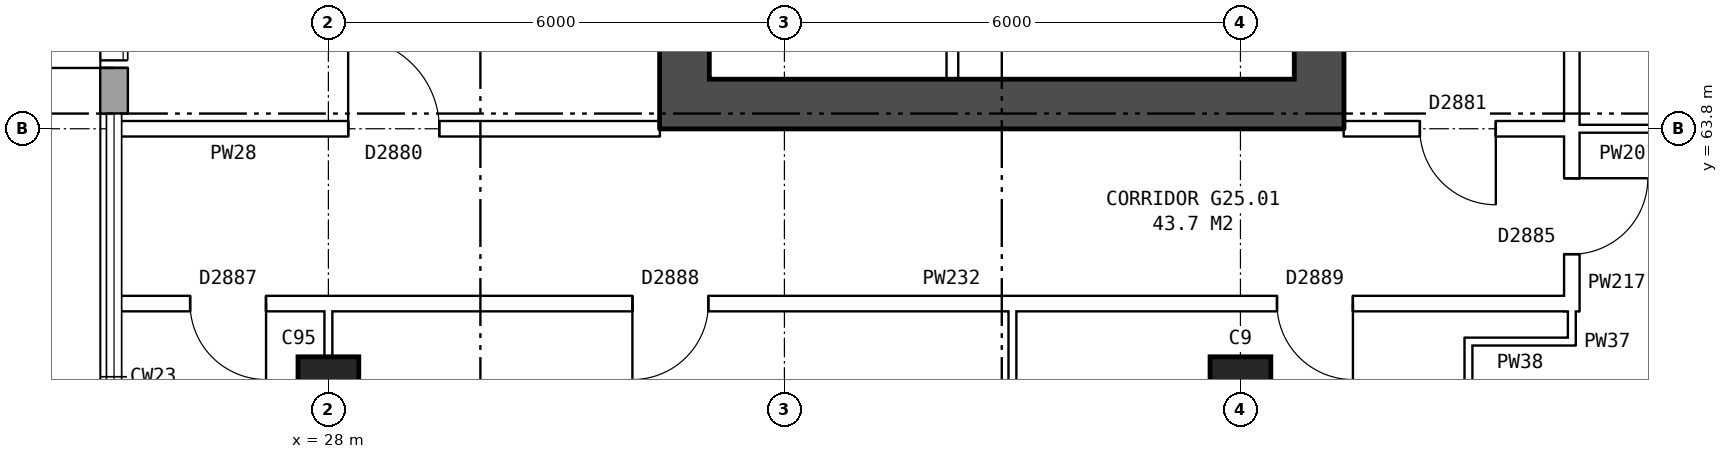
"""IFC4 building model, lengths in metres.
Left out: names, types, materials, properties, quantities, classifications, styles, units other than length and angle.
Written with IfcOpenShell. Run it as: python <this file> out.ifc"""

import sys

from ifc_helpers import new_model, si_unit, direction, frame, frame_2d, origin, origin_2d, place, context, subcontext, project, spatial, rectangle, extrude, element, fill, save


model = new_model("IFC4")
c1 = context("Model", 3, precision=1e-05, world=origin(), true_north=direction((0.0, 1.0)))
c2 = subcontext(c1, "Body", "Model", "MODEL_VIEW")
j1 = project(units=[si_unit("LENGTHUNIT", "METRE"), si_unit("PLANEANGLEUNIT", "RADIAN")], contexts=[c1])
p1 = place(None, origin())
s1 = spatial("IfcSite", under=j1, at=p1, CompositionType="ELEMENT")
p2 = place(p1, origin())
s2 = spatial("IfcBuilding", under=s1, at=p2, CompositionType="ELEMENT")
p3 = place(p2, frame((0.0, 0.0, 90.2)))
s3 = spatial("IfcBuildingStorey", under=s2, at=p3, CompositionType="ELEMENT", Elevation=90.2)
for number, where, z_axis, x_axis in (
    (1, (28.0, 60.4, 0.0), (0.0, 0.0, 1.0), (1.0, 0.0, 0.0)),
    (2, (40.0, 60.4, 0.0), (0.0, 0.0, 1.0), (1.0, 0.0, 0.0)),
):
    element("IfcColumn", number, at=place(p3, frame(where, z_axis=z_axis, x_axis=x_axis)), inside=s3, PredefinedType="COLUMN", context=c2, shape_type="SweptSolid", body=[
        extrude(rectangle(XDim=0.8, YDim=0.8, at=origin_2d()), origin(), (0.0, 0.0, 1.0), 5.6),
    ])
p4 = place(p3, frame((25.18, 67.0, 0.0), z_axis=(0.0, 0.0, 1.0), x_axis=(0.0, -1.0, 0.0)))
e3 = element("IfcWall", 3, at=p4, inside=s3, PredefinedType="STANDARD", context=c2, shape_type="SweptSolid", body=[
    extrude(rectangle(XDim=3.0, YDim=0.36, at=frame_2d((1.5, 0.0))), origin(), (0.0, 0.0, 1.0), 5.6),
])
p5 = place(p4, frame((0.7, 0.0, 3.4)))
e4 = element("IfcOpeningElement", 4, at=p5, cuts=e3, PredefinedType="OPENING", context=c2, shape_type="SweptSolid", body=[
    extrude(rectangle(XDim=1.6, YDim=1.2, at=frame_2d((0.8, 0.6))), frame((0.0, 0.19, 0.0), z_axis=(0.0, -1.0, 0.0), x_axis=(1.0, 0.0, 0.0)), (0.0, 0.0, 1.0), 0.38),
])
p6 = place(p4, frame((0.6, 0.0, 0.0)))
e5 = element("IfcOpeningElement", 5, at=p6, cuts=e3, PredefinedType="OPENING", context=c2, shape_type="SweptSolid", body=[
    extrude(rectangle(XDim=1.8, YDim=2.4, at=frame_2d((0.9, 1.2))), frame((0.0, 0.19, 0.0), z_axis=(0.0, -1.0, 0.0), x_axis=(1.0, 0.0, 0.0)), (0.0, 0.0, 1.0), 0.38),
])
p7 = place(p3, frame((41.035, 75.55, 0.0), z_axis=(0.0, 0.0, 1.0), x_axis=(0.0, -1.0, 0.0)))
e6 = element("IfcWall", 6, at=p7, inside=s3, PredefinedType="SHEAR", context=c2, shape_type="SweptSolid", body=[
    extrude(rectangle(XDim=11.1, YDim=0.65, at=frame_2d((5.55, 0.0))), origin(), (0.0, 0.0, 1.0), 5.6),
])
p8 = place(p7, frame((0.675, 0.0, 0.0)))
e7 = element("IfcOpeningElement", 7, at=p8, cuts=e6, PredefinedType="OPENING", context=c2, shape_type="SweptSolid", body=[
    extrude(rectangle(XDim=1.1, YDim=2.1, at=frame_2d((0.55, 1.05))), frame((0.0, 0.335, 0.0), z_axis=(0.0, -1.0, 0.0), x_axis=(1.0, 0.0, 0.0)), (0.0, 0.0, 1.0), 0.67),
])
p9 = place(p7, frame((2.95, 0.0, 0.0)))
e8 = element("IfcOpeningElement", 8, at=p9, cuts=e6, PredefinedType="OPENING", context=c2, shape_type="SweptSolid", body=[
    extrude(rectangle(XDim=1.1, YDim=2.1, at=frame_2d((0.55, 1.05))), frame((0.0, 0.335, 0.0), z_axis=(0.0, -1.0, 0.0), x_axis=(1.0, 0.0, 0.0)), (0.0, 0.0, 1.0), 0.67),
])
p10 = place(p7, frame((5.15, 0.0, 0.0)))
e9 = element("IfcOpeningElement", 9, at=p10, cuts=e6, PredefinedType="OPENING", context=c2, shape_type="SweptSolid", body=[
    extrude(rectangle(XDim=1.1, YDim=2.1, at=frame_2d((0.55, 1.05))), frame((0.0, 0.335, 0.0), z_axis=(0.0, -1.0, 0.0), x_axis=(1.0, 0.0, 0.0)), (0.0, 0.0, 1.0), 0.67),
])
p11 = place(p7, frame((7.35, 0.0, 0.0)))
e10 = element("IfcOpeningElement", 10, at=p11, cuts=e6, PredefinedType="OPENING", context=c2, shape_type="SweptSolid", body=[
    extrude(rectangle(XDim=1.1, YDim=2.1, at=frame_2d((0.55, 1.05))), frame((0.0, 0.335, 0.0), z_axis=(0.0, -1.0, 0.0), x_axis=(1.0, 0.0, 0.0)), (0.0, 0.0, 1.0), 0.67),
])
p12 = place(p7, frame((9.25, 0.0, 0.0)))
e11 = element("IfcOpeningElement", 11, at=p12, cuts=e6, PredefinedType="OPENING", context=c2, shape_type="SweptSolid", body=[
    extrude(rectangle(XDim=1.1, YDim=2.1, at=frame_2d((0.55, 1.05))), frame((0.0, 0.335, 0.0), z_axis=(0.0, -1.0, 0.0), x_axis=(1.0, 0.0, 0.0)), (0.0, 0.0, 1.0), 0.67),
])
p13 = place(p3, frame((32.685, 75.55, 0.0), z_axis=(0.0, 0.0, 1.0), x_axis=(0.0, -1.0, 0.0)))
e12 = element("IfcWall", 12, at=p13, inside=s3, PredefinedType="SHEAR", context=c2, shape_type="SweptSolid", body=[
    extrude(rectangle(XDim=11.1, YDim=0.65, at=frame_2d((5.55, 0.0))), origin(), (0.0, 0.0, 1.0), 5.6),
])
p14 = place(p3, frame((41.36, 64.125, 0.0), z_axis=(0.0, 0.0, 1.0), x_axis=(-1.0, 0.0, 0.0)))
e13 = element("IfcWall", 13, at=p14, inside=s3, PredefinedType="SHEAR", context=c2, shape_type="SweptSolid", body=[
    extrude(rectangle(XDim=9.0, YDim=0.65, at=frame_2d((4.5, 0.0))), origin(), (0.0, 0.0, 1.0), 5.6),
])
p15 = place(p3, frame((36.21, 66.55, 0.0), z_axis=(0.0, 0.0, 1.0), x_axis=(0.0, -1.0, 0.0)))
e14 = element("IfcWall", 14, at=p15, inside=s3, PredefinedType="PARTITIONING", context=c2, shape_type="SweptSolid", body=[
    extrude(rectangle(XDim=2.1, YDim=0.15, at=frame_2d((1.05, 0.0))), origin(), (0.0, 0.0, 1.0), 5.6),
])
p16 = place(p15, frame((0.625, 0.0, 0.0)))
e15 = element("IfcOpeningElement", 15, at=p16, cuts=e14, PredefinedType="OPENING", context=c2, shape_type="SweptSolid", body=[
    extrude(rectangle(XDim=0.85, YDim=2.1, at=frame_2d((0.425, 1.05))), frame((0.0, 0.085, 0.0), z_axis=(0.0, -1.0, 0.0), x_axis=(1.0, 0.0, 0.0)), (0.0, 0.0, 1.0), 0.17),
])
p17 = place(p3, frame((44.36, 63.9, 0.0), z_axis=(0.0, 0.0, 1.0), x_axis=(0.0, 1.0, 0.0)))
e16 = element("IfcWall", 16, at=p17, inside=s3, PredefinedType="PARTITIONING", context=c2, shape_type="SweptSolid", body=[
    extrude(rectangle(XDim=12.2, YDim=0.2, at=frame_2d((6.1, 0.0))), origin(), (0.0, 0.0, 1.0), 5.6),
])
p18 = place(p17, frame((5.1, 0.0, 0.0)))
e17 = element("IfcOpeningElement", 17, at=p18, cuts=e16, PredefinedType="OPENING", context=c2, shape_type="SweptSolid", body=[
    extrude(rectangle(XDim=2.0, YDim=2.1, at=frame_2d((1.0, 1.05))), frame((0.0, 0.11, 0.0), z_axis=(0.0, -1.0, 0.0), x_axis=(1.0, 0.0, 0.0)), (0.0, 0.0, 1.0), 0.22),
])
p19 = place(p3, frame((42.95, 61.0, 0.0), z_axis=(0.0, 0.0, 1.0), x_axis=(1.0, 0.0, 0.0)))
e18 = element("IfcWall", 18, at=p19, inside=s3, PredefinedType="PARTITIONING", context=c2, shape_type="SweptSolid", body=[
    extrude(rectangle(XDim=1.46, YDim=0.1, at=frame_2d((0.73, 0.0))), origin(), (0.0, 0.0, 1.0), 5.6),
])
p20 = place(p3, frame((25.24, 61.5, 0.0), z_axis=(0.0, 0.0, 1.0), x_axis=(1.0, 0.0, 0.0)))
e19 = element("IfcWall", 19, at=p20, inside=s3, PredefinedType="PARTITIONING", context=c2, shape_type="SweptSolid", body=[
    extrude(rectangle(XDim=19.22, YDim=0.2, at=frame_2d((9.61, 0.0))), origin(), (0.0, 0.0, 1.0), 5.6),
])
p21 = place(p20, frame((0.94, 0.0, 0.0)))
e20 = element("IfcOpeningElement", 20, at=p21, cuts=e19, PredefinedType="OPENING", context=c2, shape_type="SweptSolid", body=[
    extrude(rectangle(XDim=1.0, YDim=2.1, at=frame_2d((0.5, 1.05))), frame((0.0, 0.11, 0.0), z_axis=(0.0, -1.0, 0.0), x_axis=(1.0, 0.0, 0.0)), (0.0, 0.0, 1.0), 0.22),
])
p22 = place(p20, frame((6.76, 0.0, 0.0)))
e21 = element("IfcOpeningElement", 21, at=p22, cuts=e19, PredefinedType="OPENING", context=c2, shape_type="SweptSolid", body=[
    extrude(rectangle(XDim=1.0, YDim=2.1, at=frame_2d((0.5, 1.05))), frame((0.0, 0.11, 0.0), z_axis=(0.0, -1.0, 0.0), x_axis=(1.0, 0.0, 0.0)), (0.0, 0.0, 1.0), 0.22),
])
p23 = place(p20, frame((15.24, 0.0, 0.0)))
e22 = element("IfcOpeningElement", 22, at=p23, cuts=e19, PredefinedType="OPENING", context=c2, shape_type="SweptSolid", body=[
    extrude(rectangle(XDim=1.0, YDim=2.1, at=frame_2d((0.5, 1.05))), frame((0.0, 0.11, 0.0), z_axis=(0.0, -1.0, 0.0), x_axis=(1.0, 0.0, 0.0)), (0.0, 0.0, 1.0), 0.22),
])
p24 = place(p3, frame((25.24, 63.8, 0.0), z_axis=(0.0, 0.0, 1.0), x_axis=(1.0, 0.0, 0.0)))
e23 = element("IfcWall", 23, at=p24, inside=s3, PredefinedType="PARTITIONING", context=c2, shape_type="SweptSolid", body=[
    extrude(rectangle(XDim=7.12, YDim=0.2, at=frame_2d((3.56, 0.0))), origin(), (0.0, 0.0, 1.0), 5.6),
])
p25 = place(p24, frame((3.02, 0.0, 0.0)))
e24 = element("IfcOpeningElement", 24, at=p25, cuts=e23, PredefinedType="OPENING", context=c2, shape_type="SweptSolid", body=[
    extrude(rectangle(XDim=1.2, YDim=2.1, at=frame_2d((0.6, 1.05))), frame((0.0, 0.11, 0.0), z_axis=(0.0, -1.0, 0.0), x_axis=(1.0, 0.0, 0.0)), (0.0, 0.0, 1.0), 0.22),
])
p26 = place(p3, frame((41.36, 63.8, 0.0), z_axis=(0.0, 0.0, 1.0), x_axis=(1.0, 0.0, 0.0)))
e25 = element("IfcWall", 25, at=p26, inside=s3, PredefinedType="PARTITIONING", context=c2, shape_type="SweptSolid", body=[
    extrude(rectangle(XDim=3.1, YDim=0.2, at=frame_2d((1.55, 0.0))), origin(), (0.0, 0.0, 1.0), 5.6),
])
p27 = place(p26, frame((1.0, 0.0, 0.0)))
e26 = element("IfcOpeningElement", 26, at=p27, cuts=e25, PredefinedType="OPENING", context=c2, shape_type="SweptSolid", body=[
    extrude(rectangle(XDim=1.0, YDim=2.1, at=frame_2d((0.5, 1.05))), frame((0.0, 0.11, 0.0), z_axis=(0.0, -1.0, 0.0), x_axis=(1.0, 0.0, 0.0)), (0.0, 0.0, 1.0), 0.22),
])
p28 = place(p3, frame((44.26, 63.8, 0.0), z_axis=(0.0, 0.0, 1.0), x_axis=(1.0, 0.0, 0.0)))
e27 = element("IfcWall", 27, at=p28, inside=s3, PredefinedType="PARTITIONING", context=c2, shape_type="SweptSolid", body=[
    extrude(rectangle(XDim=19.38, YDim=0.1, at=frame_2d((9.69, 0.0))), origin(), (0.0, 0.0, 1.0), 5.6),
])
p29 = place(p28, frame((4.42, 0.0, 0.0)))
e28 = element("IfcOpeningElement", 28, at=p29, cuts=e27, PredefinedType="OPENING", context=c2, shape_type="SweptSolid", body=[
    extrude(rectangle(XDim=1.0, YDim=2.1, at=frame_2d((0.5, 1.05))), frame((0.0, 0.06, 0.0), z_axis=(0.0, -1.0, 0.0), x_axis=(1.0, 0.0, 0.0)), (0.0, 0.0, 1.0), 0.12),
])
p30 = place(p28, frame((14.06, 0.0, 0.0)))
e29 = element("IfcOpeningElement", 29, at=p30, cuts=e27, PredefinedType="OPENING", context=c2, shape_type="SweptSolid", body=[
    extrude(rectangle(XDim=1.0, YDim=2.1, at=frame_2d((0.5, 1.05))), frame((0.0, 0.06, 0.0), z_axis=(0.0, -1.0, 0.0), x_axis=(1.0, 0.0, 0.0)), (0.0, 0.0, 1.0), 0.12),
])
p31 = place(p3, frame((28.0, 54.389, 0.0), z_axis=(0.0, 0.0, 1.0), x_axis=(0.0, 1.0, 0.0)))
e30 = element("IfcWall", 30, at=p31, inside=s3, PredefinedType="PARTITIONING", context=c2, shape_type="SweptSolid", body=[
    extrude(rectangle(XDim=7.211, YDim=0.1, at=frame_2d((3.605, 0.0))), origin(), (0.0, 0.0, 1.0), 5.6),
])
p32 = place(p3, frame((37.0, 54.24, 0.0), z_axis=(0.0, 0.0, 1.0), x_axis=(0.0, 1.0, 0.0)))
e31 = element("IfcWall", 31, at=p32, inside=s3, PredefinedType="PARTITIONING", context=c2, shape_type="SweptSolid", body=[
    extrude(rectangle(XDim=7.36, YDim=0.1, at=frame_2d((3.68, 0.0))), origin(), (0.0, 0.0, 1.0), 5.6),
])
p33 = place(p3, frame((43.0, 54.24, 0.0), z_axis=(0.0, 0.0, 1.0), x_axis=(0.0, 1.0, 0.0)))
e32 = element("IfcWall", 32, at=p33, inside=s3, PredefinedType="PARTITIONING", context=c2, shape_type="SweptSolid", body=[
    extrude(rectangle(XDim=6.81, YDim=0.1, at=frame_2d((3.405, 0.0))), origin(), (0.0, 0.0, 1.0), 5.6),
])
p34 = place(p3, frame((44.36, 61.398, 0.0), z_axis=(0.0, 0.0, 1.0), x_axis=(0.0, 1.0, 0.0)))
e33 = element("IfcWall", 33, at=p34, inside=s3, PredefinedType="PARTITIONING", context=c2, shape_type="SweptSolid", body=[
    extrude(rectangle(XDim=2.502, YDim=0.2, at=frame_2d((1.251, 0.0))), origin(), (0.0, 0.0, 1.0), 5.6),
])
p35 = place(p34, frame((0.751, 0.0, 0.0)))
e34 = element("IfcOpeningElement", 34, at=p35, cuts=e33, PredefinedType="OPENING", context=c2, shape_type="SweptSolid", body=[
    extrude(rectangle(XDim=1.0, YDim=2.1, at=frame_2d((0.5, 1.05))), frame((0.0, 0.11, 0.0), z_axis=(0.0, -1.0, 0.0), x_axis=(1.0, 0.0, 0.0)), (0.0, 0.0, 1.0), 0.22),
])
p36 = place(p3, frame((44.36, 60.95, 0.0), z_axis=(0.0, 0.0, 1.0), x_axis=(0.0, 1.0, 0.0)))
e35 = element("IfcWall", 35, at=p36, inside=s3, PredefinedType="PARTITIONING", context=c2, shape_type="SweptSolid", body=[
    extrude(rectangle(XDim=0.652, YDim=0.1, at=frame_2d((0.326, 0.0))), origin(), (0.0, 0.0, 1.0), 5.6),
])
p37 = place(p5, origin())
e36 = element("IfcWindow", 36, at=p37, inside=s3, PartitioningType="DOUBLE_PANEL_HORIZONTAL", PredefinedType="WINDOW", context=c2, shape_type="SweptSolid", body=[
    extrude(rectangle(XDim=1.6, YDim=1.2, at=frame_2d((0.8, 0.6))), frame((0.0, 0.15, 0.0), z_axis=(0.0, -1.0, 0.0), x_axis=(1.0, 0.0, 0.0)), (0.0, 0.0, 1.0), 0.06),
])
fill(e4, e36)
p38 = place(p6, frame((1.8, 0.0, 0.0), z_axis=(0.0, 0.0, 1.0), x_axis=(-1.0, 0.0, 0.0)))
e37 = element("IfcDoor", 37, at=p38, inside=s3, OperationType="DOUBLE_DOOR_SINGLE_SWING", PredefinedType="DOOR", context=c2, shape_type="SweptSolid", body=[
    extrude(rectangle(XDim=1.8, YDim=2.4, at=frame_2d((0.9, 1.2))), frame((0.0, 0.025, 0.0), z_axis=(0.0, -1.0, 0.0), x_axis=(1.0, 0.0, 0.0)), (0.0, 0.0, 1.0), 0.05),
])
fill(e5, e37)
p39 = place(p21, frame((1.0, 0.0, 0.0), z_axis=(0.0, 0.0, 1.0), x_axis=(-1.0, 0.0, 0.0)))
e38 = element("IfcDoor", 38, at=p39, inside=s3, OperationType="SINGLE_SWING_LEFT", PredefinedType="DOOR", context=c2, shape_type="SweptSolid", body=[
    extrude(rectangle(XDim=1.0, YDim=2.1, at=frame_2d((0.5, 1.05))), frame((0.0, 0.025, 0.0), z_axis=(0.0, -1.0, 0.0), x_axis=(1.0, 0.0, 0.0)), (0.0, 0.0, 1.0), 0.05),
])
fill(e20, e38)
p40 = place(p22, frame((1.0, 0.0, 0.0), z_axis=(0.0, 0.0, 1.0), x_axis=(-1.0, 0.0, 0.0)))
e39 = element("IfcDoor", 39, at=p40, inside=s3, OperationType="SINGLE_SWING_RIGHT", PredefinedType="DOOR", context=c2, shape_type="SweptSolid", body=[
    extrude(rectangle(XDim=1.0, YDim=2.1, at=frame_2d((0.5, 1.05))), frame((0.0, 0.025, 0.0), z_axis=(0.0, -1.0, 0.0), x_axis=(1.0, 0.0, 0.0)), (0.0, 0.0, 1.0), 0.05),
])
fill(e21, e39)
p41 = place(p23, frame((1.0, 0.0, 0.0), z_axis=(0.0, 0.0, 1.0), x_axis=(-1.0, 0.0, 0.0)))
e40 = element("IfcDoor", 40, at=p41, inside=s3, OperationType="SINGLE_SWING_LEFT", PredefinedType="DOOR", context=c2, shape_type="SweptSolid", body=[
    extrude(rectangle(XDim=1.0, YDim=2.1, at=frame_2d((0.5, 1.05))), frame((0.0, 0.025, 0.0), z_axis=(0.0, -1.0, 0.0), x_axis=(1.0, 0.0, 0.0)), (0.0, 0.0, 1.0), 0.05),
])
fill(e22, e40)
p42 = place(p25, origin())
e41 = element("IfcDoor", 41, at=p42, inside=s3, OperationType="SINGLE_SWING_LEFT", PredefinedType="DOOR", context=c2, shape_type="SweptSolid", body=[
    extrude(rectangle(XDim=1.2, YDim=2.1, at=frame_2d((0.6, 1.05))), frame((0.0, 0.025, 0.0), z_axis=(0.0, -1.0, 0.0), x_axis=(1.0, 0.0, 0.0)), (0.0, 0.0, 1.0), 0.05),
])
fill(e24, e41)
p43 = place(p27, frame((1.0, 0.0, 0.0), z_axis=(0.0, 0.0, 1.0), x_axis=(-1.0, 0.0, 0.0)))
e42 = element("IfcDoor", 42, at=p43, inside=s3, OperationType="SINGLE_SWING_LEFT", PredefinedType="DOOR", context=c2, shape_type="SweptSolid", body=[
    extrude(rectangle(XDim=1.0, YDim=2.1, at=frame_2d((0.5, 1.05))), frame((0.0, 0.025, 0.0), z_axis=(0.0, -1.0, 0.0), x_axis=(1.0, 0.0, 0.0)), (0.0, 0.0, 1.0), 0.05),
])
fill(e26, e42)
p44 = place(p35, frame((1.0, 0.0, 0.0), z_axis=(0.0, 0.0, 1.0), x_axis=(-1.0, 0.0, 0.0)))
e43 = element("IfcDoor", 43, at=p44, inside=s3, OperationType="SINGLE_SWING_LEFT", PredefinedType="DOOR", context=c2, shape_type="SweptSolid", body=[
    extrude(rectangle(XDim=1.0, YDim=2.1, at=frame_2d((0.5, 1.05))), frame((0.0, 0.025, 0.0), z_axis=(0.0, -1.0, 0.0), x_axis=(1.0, 0.0, 0.0)), (0.0, 0.0, 1.0), 0.05),
])
fill(e34, e43)
save(model, sys.argv[1])
